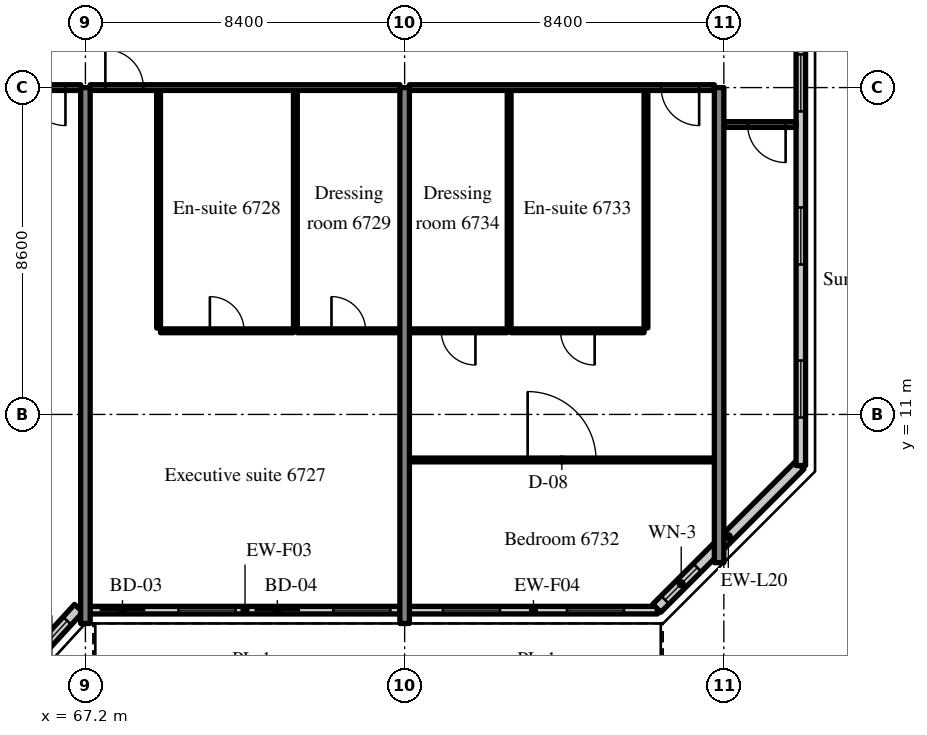
"""IFC4 building model, lengths in metres.
Left out: names, types, materials, properties, quantities, classifications, styles, units other than length and angle.
Written with IfcOpenShell. Run it as: python <this file> out.ifc"""

import sys

from ifc_helpers import new_model, si_unit, direction, frame, frame_2d, origin, place, context, subcontext, project, spatial, rectangle, extrude, source, transform, mapped, element, fill, save


model = new_model("IFC4")
c1 = context("Model", 3, precision=1e-05, world=origin(), true_north=direction((0.0, 1.0)))
c2 = subcontext(c1, "Body", "Model", "MODEL_VIEW")
j1 = project(units=[si_unit("LENGTHUNIT", "METRE"), si_unit("PLANEANGLEUNIT", "RADIAN")], contexts=[c1])
p1 = place(None, origin())
s1 = spatial("IfcSite", under=j1, at=p1, CompositionType="ELEMENT")
p2 = place(p1, origin())
s2 = spatial("IfcBuilding", under=s1, at=p2, CompositionType="ELEMENT")
p3 = place(p2, frame((0.0, 0.0, 281.7)))
s3 = spatial("IfcBuildingStorey", under=s2, at=p3, CompositionType="ELEMENT", Elevation=281.7)
m1 = source(origin(), c2, "Body", "SweptSolid", [
    extrude(rectangle(XDim=14.1, YDim=0.25, at=frame_2d((7.05, 0.0))), origin(), (0.0, 0.0, 1.0), 3.72),
])
for number, where, z_axis, x_axis in (
    (1, (67.2, 5.5, 0.0), (0.0, 0.0, 1.0), (0.0, 1.0, 0.0)),
    (2, (75.6, 5.5, 0.0), (0.0, 0.0, 1.0), (0.0, 1.0, 0.0)),
):
    element("IfcWall", number, at=place(p3, frame(where, z_axis=z_axis, x_axis=x_axis)), inside=s3, PredefinedType="SHEAR", context=c2, shape_type="MappedRepresentation", body=[
        mapped(m1, transform((0.0, 0.0, 0.0), scale=1.0)),
    ])
m2 = source(origin(), c2, "Body", "SweptSolid", [
    extrude(rectangle(XDim=12.5, YDim=0.25, at=frame_2d((6.25, 0.0))), origin(), (0.0, 0.0, 1.0), 3.72),
])
p4 = place(p3, frame((83.875, 7.1, 0.0), z_axis=(0.0, 0.0, 1.0), x_axis=(0.0, 1.0, 0.0)))
e3 = element("IfcWall", 3, at=p4, inside=s3, PredefinedType="SHEAR", context=c2, shape_type="MappedRepresentation", body=[
    mapped(m2, transform((0.0, 0.0, 0.0), scale=1.0)),
])
m3 = source(origin(), c2, "Body", "SweptSolid", [
    extrude(rectangle(XDim=2.398, YDim=0.3, at=frame_2d((1.199, 0.0))), origin(), (0.0, 0.0, 1.0), 3.72),
])
p5 = place(p3, frame((65.404, 4.131, 0.0), z_axis=(0.0, 0.0, 1.0), x_axis=(0.675374189419, 0.737475222815, 0.0)))
e4 = element("IfcWall", 4, at=p5, inside=s3, PredefinedType="SOLIDWALL", context=c2, shape_type="MappedRepresentation", body=[
    mapped(m3, transform((0.0, 0.0, 0.0), scale=1.0)),
])
m4 = source(origin(), c2, "Body", "SweptSolid", [
    extrude(rectangle(XDim=1.5, YDim=2.0, at=frame_2d((0.75, 1.0))), frame((0.0, 0.16, 0.0), z_axis=(0.0, -1.0, 0.0), x_axis=(1.0, 0.0, 0.0)), (0.0, 0.0, 1.0), 0.32),
])
p6 = place(p5, frame((0.449, 0.0, 0.9)))
e5 = element("IfcOpeningElement", 5, at=p6, cuts=e4, PredefinedType="OPENING", context=c2, shape_type="MappedRepresentation", body=[
    mapped(m4, transform((0.0, 0.0, 0.0), scale=1.0)),
])
m5 = source(origin(), c2, "Body", "SweptSolid", [
    extrude(rectangle(XDim=8.15, YDim=0.2, at=frame_2d((4.075, 0.0))), origin(), (0.0, 0.0, 1.0), 3.17),
])
p7 = place(p3, frame((67.325, 5.85, 0.0), z_axis=(0.0, 0.0, 1.0), x_axis=(1.0, 0.0, 0.0)))
e6 = element("IfcWall", 6, at=p7, inside=s3, PredefinedType="SOLIDWALL", context=c2, shape_type="MappedRepresentation", body=[
    mapped(m5, transform((0.0, 0.0, 0.0), scale=1.0)),
])
m6 = source(origin(), c2, "Body", "SweptSolid", [
    extrude(rectangle(XDim=1.2, YDim=2.4, at=frame_2d((0.6, 1.2))), frame((0.0, 0.11, 0.0), z_axis=(0.0, -1.0, 0.0), x_axis=(1.0, 0.0, 0.0)), (0.0, 0.0, 1.0), 0.22),
])
p8 = place(p7, frame((0.25, 0.0, 0.0)))
e7 = element("IfcOpeningElement", 7, at=p8, cuts=e6, PredefinedType="OPENING", context=c2, shape_type="MappedRepresentation", body=[
    mapped(m6, transform((0.0, 0.0, 0.0), scale=1.0)),
])
m7 = source(origin(), c2, "Body", "SweptSolid", [
    extrude(rectangle(XDim=1.5, YDim=1.5, at=frame_2d((0.75, 0.75))), frame((0.0, 0.11, 0.0), z_axis=(0.0, -1.0, 0.0), x_axis=(1.0, 0.0, 0.0)), (0.0, 0.0, 1.0), 0.22),
])
p9 = place(p7, frame((2.325, 0.0, 0.9)))
e8 = element("IfcOpeningElement", 8, at=p9, cuts=e6, PredefinedType="OPENING", context=c2, shape_type="MappedRepresentation", body=[
    mapped(m7, transform((0.0, 0.0, 0.0), scale=1.0)),
])
p10 = place(p7, frame((4.325, 0.0, 0.0)))
e9 = element("IfcOpeningElement", 9, at=p10, cuts=e6, PredefinedType="OPENING", context=c2, shape_type="MappedRepresentation", body=[
    mapped(m6, transform((0.0, 0.0, 0.0), scale=1.0)),
])
p11 = place(p7, frame((6.4, 0.0, 0.9)))
e10 = element("IfcOpeningElement", 10, at=p11, cuts=e6, PredefinedType="OPENING", context=c2, shape_type="MappedRepresentation", body=[
    mapped(m7, transform((0.0, 0.0, 0.0), scale=1.0)),
])
m8 = source(origin(), c2, "Body", "SweptSolid", [
    extrude(rectangle(XDim=6.53, YDim=0.2, at=frame_2d((3.265, 0.0))), origin(), (0.0, 0.0, 1.0), 3.17),
])
p12 = place(p3, frame((75.725, 5.85, 0.0), z_axis=(0.0, 0.0, 1.0), x_axis=(1.0, 0.0, 0.0)))
e11 = element("IfcWall", 11, at=p12, inside=s3, PredefinedType="SOLIDWALL", context=c2, shape_type="MappedRepresentation", body=[
    mapped(m8, transform((0.0, 0.0, 0.0), scale=1.0)),
])
p13 = place(p12, frame((0.883, 0.0, 0.9)))
e12 = element("IfcOpeningElement", 12, at=p13, cuts=e11, PredefinedType="OPENING", context=c2, shape_type="MappedRepresentation", body=[
    mapped(m7, transform((0.0, 0.0, 0.0), scale=1.0)),
])
p14 = place(p12, frame((4.147, 0.0, 0.9)))
e13 = element("IfcOpeningElement", 13, at=p14, cuts=e11, PredefinedType="OPENING", context=c2, shape_type="MappedRepresentation", body=[
    mapped(m7, transform((0.0, 0.0, 0.0), scale=1.0)),
])
m9 = source(origin(), c2, "Body", "SweptSolid", [
    extrude(rectangle(XDim=5.326, YDim=0.3, at=frame_2d((2.663, 0.0))), origin(), (0.0, 0.0, 1.0), 3.72),
])
p15 = place(p3, frame((82.234, 5.9, 0.0), z_axis=(0.0, 0.0, 1.0), x_axis=(0.707083859269, 0.707129702361, 0.0)))
e14 = element("IfcWall", 14, at=p15, inside=s3, PredefinedType="SOLIDWALL", context=c2, shape_type="MappedRepresentation", body=[
    mapped(m9, transform((0.0, 0.0, 0.0), scale=1.0)),
])
m10 = source(origin(), c2, "Body", "SweptSolid", [
    extrude(rectangle(XDim=1.2, YDim=1.5, at=frame_2d((0.6, 0.75))), frame((0.0, 0.16, 0.0), z_axis=(0.0, -1.0, 0.0), x_axis=(1.0, 0.0, 0.0)), (0.0, 0.0, 1.0), 0.32),
])
p16 = place(p15, frame((0.31, 0.0, 0.9)))
e15 = element("IfcOpeningElement", 15, at=p16, cuts=e14, PredefinedType="OPENING", context=c2, shape_type="MappedRepresentation", body=[
    mapped(m10, transform((0.0, 0.0, 0.0), scale=1.0)),
])
m11 = source(origin(), c2, "Body", "SweptSolid", [
    extrude(rectangle(XDim=28.189, YDim=0.25, at=frame_2d((14.095, 0.0))), origin(), (0.0, 0.0, 1.0), 3.72),
])
p17 = place(p3, frame((86.025, 9.655, 0.0), z_axis=(0.0, 0.0, 1.0), x_axis=(0.0, 1.0, 0.0)))
e16 = element("IfcWall", 16, at=p17, inside=s3, PredefinedType="SOLIDWALL", context=c2, shape_type="MappedRepresentation", body=[
    mapped(m11, transform((0.0, 0.0, 0.0), scale=1.0)),
])
m12 = source(origin(), c2, "Body", "SweptSolid", [
    extrude(rectangle(XDim=1.5, YDim=1.5, at=frame_2d((0.75, 0.75))), frame((0.0, 0.135, 0.0), z_axis=(0.0, -1.0, 0.0), x_axis=(1.0, 0.0, 0.0)), (0.0, 0.0, 1.0), 0.27),
])
p18 = place(p17, frame((1.263, 0.0, 0.9)))
e17 = element("IfcOpeningElement", 17, at=p18, cuts=e16, PredefinedType="OPENING", context=c2, shape_type="MappedRepresentation", body=[
    mapped(m12, transform((0.0, 0.0, 0.0), scale=1.0)),
])
p19 = place(p17, frame((5.291, 0.0, 0.9)))
e18 = element("IfcOpeningElement", 18, at=p19, cuts=e16, PredefinedType="OPENING", context=c2, shape_type="MappedRepresentation", body=[
    mapped(m12, transform((0.0, 0.0, 0.0), scale=1.0)),
])
p20 = place(p17, frame((9.318, 0.0, 0.9)))
e19 = element("IfcOpeningElement", 19, at=p20, cuts=e16, PredefinedType="OPENING", context=c2, shape_type="MappedRepresentation", body=[
    mapped(m12, transform((0.0, 0.0, 0.0), scale=1.0)),
])
p21 = place(p17, frame((13.345, 0.0, 0.9)))
e20 = element("IfcOpeningElement", 20, at=p21, cuts=e16, PredefinedType="OPENING", context=c2, shape_type="MappedRepresentation", body=[
    mapped(m12, transform((0.0, 0.0, 0.0), scale=1.0)),
])
p22 = place(p17, frame((17.372, 0.0, 0.9)))
e21 = element("IfcOpeningElement", 21, at=p22, cuts=e16, PredefinedType="OPENING", context=c2, shape_type="MappedRepresentation", body=[
    mapped(m12, transform((0.0, 0.0, 0.0), scale=1.0)),
])
p23 = place(p17, frame((21.399, 0.0, 0.9)))
e22 = element("IfcOpeningElement", 22, at=p23, cuts=e16, PredefinedType="OPENING", context=c2, shape_type="MappedRepresentation", body=[
    mapped(m12, transform((0.0, 0.0, 0.0), scale=1.0)),
])
p24 = place(p17, frame((25.426, 0.0, 0.9)))
e23 = element("IfcOpeningElement", 23, at=p24, cuts=e16, PredefinedType="OPENING", context=c2, shape_type="MappedRepresentation", body=[
    mapped(m12, transform((0.0, 0.0, 0.0), scale=1.0)),
])
m13 = source(origin(), c2, "Body", "SweptSolid", [
    extrude(rectangle(XDim=8.15, YDim=0.15, at=frame_2d((4.075, 0.0))), origin(), (0.0, 0.0, 1.0), 3.02),
])
p25 = place(p3, frame((58.925, 19.6, 0.0), z_axis=(0.0, 0.0, 1.0), x_axis=(1.0, 0.0, 0.0)))
e24 = element("IfcWall", 24, at=p25, inside=s3, PredefinedType="PARTITIONING", context=c2, shape_type="MappedRepresentation", body=[
    mapped(m13, transform((0.0, 0.0, 0.0), scale=1.0)),
])
m14 = source(origin(), c2, "Body", "SweptSolid", [
    extrude(rectangle(XDim=1.0, YDim=2.1, at=frame_2d((0.5, 1.05))), frame((0.0, 0.085, 0.0), z_axis=(0.0, -1.0, 0.0), x_axis=(1.0, 0.0, 0.0)), (0.0, 0.0, 1.0), 0.17),
])
p26 = place(p25, frame((6.75, 0.0, 0.0)))
e25 = element("IfcOpeningElement", 25, at=p26, cuts=e24, PredefinedType="OPENING", context=c2, shape_type="MappedRepresentation", body=[
    mapped(m14, transform((0.0, 0.0, 0.0), scale=1.0)),
])
m15 = source(origin(), c2, "Body", "SweptSolid", [
    extrude(rectangle(XDim=6.25, YDim=0.1, at=frame_2d((3.125, 0.0))), origin(), (0.0, 0.0, 1.0), 3.72),
])
for number, where, z_axis, x_axis in (
    (26, (69.125, 13.275, 0.0), (0.0, 0.0, 1.0), (0.0, 1.0, 0.0)),
    (27, (72.725, 13.275, 0.0), (0.0, 0.0, 1.0), (0.0, 1.0, 0.0)),
):
    element("IfcWall", number, at=place(p3, frame(where, z_axis=z_axis, x_axis=x_axis)), inside=s3, PredefinedType="PARTITIONING", context=c2, shape_type="MappedRepresentation", body=[
        mapped(m15, transform((0.0, 0.0, 0.0), scale=1.0)),
    ])
m16 = source(origin(), c2, "Body", "SweptSolid", [
    extrude(rectangle(XDim=3.5, YDim=0.1, at=frame_2d((1.75, 0.0))), origin(), (0.0, 0.0, 1.0), 3.72),
])
p27 = place(p3, frame((69.175, 13.2, 0.0), z_axis=(0.0, 0.0, 1.0), x_axis=(1.0, 0.0, 0.0)))
e28 = element("IfcWall", 28, at=p27, inside=s3, PredefinedType="PARTITIONING", context=c2, shape_type="MappedRepresentation", body=[
    mapped(m16, transform((0.0, 0.0, 0.0), scale=1.0)),
])
m17 = source(origin(), c2, "Body", "SweptSolid", [
    extrude(rectangle(XDim=0.9, YDim=2.1, at=frame_2d((0.45, 1.05))), frame((0.0, 0.06, 0.0), z_axis=(0.0, -1.0, 0.0), x_axis=(1.0, 0.0, 0.0)), (0.0, 0.0, 1.0), 0.12),
])
p28 = place(p27, frame((1.3, 0.0, 0.0)))
e29 = element("IfcOpeningElement", 29, at=p28, cuts=e28, PredefinedType="OPENING", context=c2, shape_type="MappedRepresentation", body=[
    mapped(m17, transform((0.0, 0.0, 0.0), scale=1.0)),
])
m18 = source(origin(), c2, "Body", "SweptSolid", [
    extrude(rectangle(XDim=2.7, YDim=0.1, at=frame_2d((1.35, 0.0))), origin(), (0.0, 0.0, 1.0), 3.72),
])
p29 = place(p3, frame((72.775, 13.2, 0.0), z_axis=(0.0, 0.0, 1.0), x_axis=(1.0, 0.0, 0.0)))
e30 = element("IfcWall", 30, at=p29, inside=s3, PredefinedType="PARTITIONING", context=c2, shape_type="MappedRepresentation", body=[
    mapped(m18, transform((0.0, 0.0, 0.0), scale=1.0)),
])
p30 = place(p29, frame((0.9, 0.0, 0.0)))
e31 = element("IfcOpeningElement", 31, at=p30, cuts=e30, PredefinedType="OPENING", context=c2, shape_type="MappedRepresentation", body=[
    mapped(m17, transform((0.0, 0.0, 0.0), scale=1.0)),
])
m19 = source(origin(), c2, "Body", "SweptSolid", [
    extrude(rectangle(XDim=8.15, YDim=0.15, at=frame_2d((4.075, 0.0))), origin(), (0.0, 0.0, 1.0), 3.02),
])
p31 = place(p3, frame((67.325, 19.6, 0.0), z_axis=(0.0, 0.0, 1.0), x_axis=(1.0, 0.0, 0.0)))
e32 = element("IfcWall", 32, at=p31, inside=s3, PredefinedType="PARTITIONING", context=c2, shape_type="MappedRepresentation", body=[
    mapped(m19, transform((0.0, 0.0, 0.0), scale=1.0)),
])
p32 = place(p31, frame((0.4, 0.0, 0.0)))
e33 = element("IfcOpeningElement", 33, at=p32, cuts=e32, PredefinedType="OPENING", context=c2, shape_type="MappedRepresentation", body=[
    mapped(m14, transform((0.0, 0.0, 0.0), scale=1.0)),
])
for number, where, z_axis, x_axis in (
    (34, (81.95, 13.275, 0.0), (0.0, 0.0, 1.0), (0.0, 1.0, 0.0)),
    (35, (78.35, 13.275, 0.0), (0.0, 0.0, 1.0), (0.0, 1.0, 0.0)),
):
    element("IfcWall", number, at=place(p3, frame(where, z_axis=z_axis, x_axis=x_axis)), inside=s3, PredefinedType="PARTITIONING", context=c2, shape_type="MappedRepresentation", body=[
        mapped(m15, transform((0.0, 0.0, 0.0), scale=1.0)),
    ])
p33 = place(p3, frame((78.4, 13.2, 0.0), z_axis=(0.0, 0.0, 1.0), x_axis=(1.0, 0.0, 0.0)))
e36 = element("IfcWall", 36, at=p33, inside=s3, PredefinedType="PARTITIONING", context=c2, shape_type="MappedRepresentation", body=[
    mapped(m16, transform((0.0, 0.0, 0.0), scale=1.0)),
])
p34 = place(p33, frame((1.3, 0.0, 0.0)))
e37 = element("IfcOpeningElement", 37, at=p34, cuts=e36, PredefinedType="OPENING", context=c2, shape_type="MappedRepresentation", body=[
    mapped(m17, transform((0.0, 0.0, 0.0), scale=1.0)),
])
m20 = source(origin(), c2, "Body", "SweptSolid", [
    extrude(rectangle(XDim=2.575, YDim=0.1, at=frame_2d((1.288, 0.0))), origin(), (0.0, 0.0, 1.0), 3.72),
])
p35 = place(p3, frame((75.725, 13.2, 0.0), z_axis=(0.0, 0.0, 1.0), x_axis=(1.0, 0.0, 0.0)))
e38 = element("IfcWall", 38, at=p35, inside=s3, PredefinedType="PARTITIONING", context=c2, shape_type="MappedRepresentation", body=[
    mapped(m20, transform((0.0, 0.0, 0.0), scale=1.0)),
])
p36 = place(p35, frame((0.838, 0.0, 0.0)))
e39 = element("IfcOpeningElement", 39, at=p36, cuts=e38, PredefinedType="OPENING", context=c2, shape_type="MappedRepresentation", body=[
    mapped(m17, transform((0.0, 0.0, 0.0), scale=1.0)),
])
m21 = source(origin(), c2, "Body", "SweptSolid", [
    extrude(rectangle(XDim=8.025, YDim=0.1, at=frame_2d((4.012, 0.0))), origin(), (0.0, 0.0, 1.0), 3.72),
])
p37 = place(p3, frame((75.725, 9.802, 0.0), z_axis=(0.0, 0.0, 1.0), x_axis=(1.0, 0.0, 0.0)))
e40 = element("IfcWall", 40, at=p37, inside=s3, PredefinedType="PARTITIONING", context=c2, shape_type="MappedRepresentation", body=[
    mapped(m21, transform((0.0, 0.0, 0.0), scale=1.0)),
])
m22 = source(origin(), c2, "Body", "SweptSolid", [
    extrude(rectangle(XDim=1.8, YDim=2.1, at=frame_2d((0.9, 1.05))), frame((0.0, 0.06, 0.0), z_axis=(0.0, -1.0, 0.0), x_axis=(1.0, 0.0, 0.0)), (0.0, 0.0, 1.0), 0.12),
])
p38 = place(p37, frame((3.112, 0.0, 0.0)))
e41 = element("IfcOpeningElement", 41, at=p38, cuts=e40, PredefinedType="OPENING", context=c2, shape_type="MappedRepresentation", body=[
    mapped(m22, transform((0.0, 0.0, 0.0), scale=1.0)),
])
m23 = source(origin(), c2, "Body", "SweptSolid", [
    extrude(rectangle(XDim=8.025, YDim=0.15, at=frame_2d((4.012, 0.0))), origin(), (0.0, 0.0, 1.0), 3.02),
])
p39 = place(p3, frame((75.725, 19.6, 0.0), z_axis=(0.0, 0.0, 1.0), x_axis=(1.0, 0.0, 0.0)))
e42 = element("IfcWall", 42, at=p39, inside=s3, PredefinedType="PARTITIONING", context=c2, shape_type="MappedRepresentation", body=[
    mapped(m23, transform((0.0, 0.0, 0.0), scale=1.0)),
])
p40 = place(p39, frame((6.625, 0.0, 0.0)))
e43 = element("IfcOpeningElement", 43, at=p40, cuts=e42, PredefinedType="OPENING", context=c2, shape_type="MappedRepresentation", body=[
    mapped(m14, transform((0.0, 0.0, 0.0), scale=1.0)),
])
m24 = source(origin(), c2, "Body", "SweptSolid", [
    extrude(rectangle(XDim=1.9, YDim=0.15, at=frame_2d((0.95, 0.0))), origin(), (0.0, 0.0, 1.0), 3.02),
])
p41 = place(p3, frame((84.0, 18.628, 0.0), z_axis=(0.0, 0.0, 1.0), x_axis=(1.0, 0.0, 0.0)))
e44 = element("IfcWall", 44, at=p41, inside=s3, PredefinedType="PARTITIONING", context=c2, shape_type="MappedRepresentation", body=[
    mapped(m24, transform((0.0, 0.0, 0.0), scale=1.0)),
])
p42 = place(p41, frame((0.625, 0.0, 0.0)))
e45 = element("IfcOpeningElement", 45, at=p42, cuts=e44, PredefinedType="OPENING", context=c2, shape_type="MappedRepresentation", body=[
    mapped(m14, transform((0.0, 0.0, 0.0), scale=1.0)),
])
m25 = source(origin(), c2, "Body", "SweptSolid", [
    extrude(rectangle(XDim=1.5, YDim=2.0, at=frame_2d((0.75, 1.0))), frame((0.0, 0.03, 0.0), z_axis=(0.0, -1.0, 0.0), x_axis=(1.0, 0.0, 0.0)), (0.0, 0.0, 1.0), 0.06),
])
p43 = place(p6, origin())
e46 = element("IfcWindow", 46, at=p43, inside=s3, PartitioningType="SINGLE_PANEL", PredefinedType="WINDOW", context=c2, shape_type="MappedRepresentation", body=[
    mapped(m25, transform((0.0, 0.0, 0.0), scale=1.0)),
])
fill(e5, e46)
m26 = source(origin(), c2, "Body", "SweptSolid", [
    extrude(rectangle(XDim=1.2, YDim=2.4, at=frame_2d((0.6, 1.2))), frame((0.0, 0.025, 0.0), z_axis=(0.0, -1.0, 0.0), x_axis=(1.0, 0.0, 0.0)), (0.0, 0.0, 1.0), 0.05),
])
p44 = place(p8, origin())
e47 = element("IfcDoor", 47, at=p44, inside=s3, OperationType="SLIDING_TO_LEFT", PredefinedType="DOOR", context=c2, shape_type="MappedRepresentation", body=[
    mapped(m26, transform((0.0, 0.0, 0.0), scale=1.0)),
])
fill(e7, e47)
m27 = source(origin(), c2, "Body", "SweptSolid", [
    extrude(rectangle(XDim=1.5, YDim=1.5, at=frame_2d((0.75, 0.75))), frame((0.0, 0.03, 0.0), z_axis=(0.0, -1.0, 0.0), x_axis=(1.0, 0.0, 0.0)), (0.0, 0.0, 1.0), 0.06),
])
p45 = place(p9, origin())
e48 = element("IfcWindow", 48, at=p45, inside=s3, PartitioningType="SINGLE_PANEL", PredefinedType="WINDOW", context=c2, shape_type="MappedRepresentation", body=[
    mapped(m27, transform((0.0, 0.0, 0.0), scale=1.0)),
])
fill(e8, e48)
p46 = place(p10, origin())
e49 = element("IfcDoor", 49, at=p46, inside=s3, OperationType="SLIDING_TO_RIGHT", PredefinedType="DOOR", context=c2, shape_type="MappedRepresentation", body=[
    mapped(m26, transform((0.0, 0.0, 0.0), scale=1.0)),
])
fill(e9, e49)
p47 = place(p11, origin())
e50 = element("IfcWindow", 50, at=p47, inside=s3, PartitioningType="SINGLE_PANEL", PredefinedType="WINDOW", context=c2, shape_type="MappedRepresentation", body=[
    mapped(m27, transform((0.0, 0.0, 0.0), scale=1.0)),
])
fill(e10, e50)
p48 = place(p13, origin())
e51 = element("IfcWindow", 51, at=p48, inside=s3, PartitioningType="SINGLE_PANEL", PredefinedType="WINDOW", context=c2, shape_type="MappedRepresentation", body=[
    mapped(m27, transform((0.0, 0.0, 0.0), scale=1.0)),
])
fill(e12, e51)
p49 = place(p14, origin())
e52 = element("IfcWindow", 52, at=p49, inside=s3, PartitioningType="SINGLE_PANEL", PredefinedType="WINDOW", context=c2, shape_type="MappedRepresentation", body=[
    mapped(m27, transform((0.0, 0.0, 0.0), scale=1.0)),
])
fill(e13, e52)
m28 = source(origin(), c2, "Body", "SweptSolid", [
    extrude(rectangle(XDim=1.2, YDim=1.5, at=frame_2d((0.6, 0.75))), frame((0.0, 0.03, 0.0), z_axis=(0.0, -1.0, 0.0), x_axis=(1.0, 0.0, 0.0)), (0.0, 0.0, 1.0), 0.06),
])
p50 = place(p16, origin())
e53 = element("IfcWindow", 53, at=p50, inside=s3, PartitioningType="SINGLE_PANEL", PredefinedType="WINDOW", context=c2, shape_type="MappedRepresentation", body=[
    mapped(m28, transform((0.0, 0.0, 0.0), scale=1.0)),
])
fill(e15, e53)
p51 = place(p18, origin())
e54 = element("IfcWindow", 54, at=p51, inside=s3, PartitioningType="SINGLE_PANEL", PredefinedType="WINDOW", context=c2, shape_type="MappedRepresentation", body=[
    mapped(m27, transform((0.0, 0.0, 0.0), scale=1.0)),
])
fill(e17, e54)
p52 = place(p19, origin())
e55 = element("IfcWindow", 55, at=p52, inside=s3, PartitioningType="SINGLE_PANEL", PredefinedType="WINDOW", context=c2, shape_type="MappedRepresentation", body=[
    mapped(m27, transform((0.0, 0.0, 0.0), scale=1.0)),
])
fill(e18, e55)
p53 = place(p20, origin())
e56 = element("IfcWindow", 56, at=p53, inside=s3, PartitioningType="SINGLE_PANEL", PredefinedType="WINDOW", context=c2, shape_type="MappedRepresentation", body=[
    mapped(m27, transform((0.0, 0.0, 0.0), scale=1.0)),
])
fill(e19, e56)
m29 = source(origin(), c2, "Body", "SweptSolid", [
    extrude(rectangle(XDim=1.0, YDim=2.1, at=frame_2d((0.5, 1.05))), frame((0.0, 0.025, 0.0), z_axis=(0.0, -1.0, 0.0), x_axis=(1.0, 0.0, 0.0)), (0.0, 0.0, 1.0), 0.05),
])
p54 = place(p26, origin())
e57 = element("IfcDoor", 57, at=p54, inside=s3, OperationType="SINGLE_SWING_RIGHT", PredefinedType="DOOR", context=c2, shape_type="MappedRepresentation", body=[
    mapped(m29, transform((0.0, 0.0, 0.0), scale=1.0)),
])
fill(e25, e57)
m30 = source(origin(), c2, "Body", "SweptSolid", [
    extrude(rectangle(XDim=0.9, YDim=2.1, at=frame_2d((0.45, 1.05))), frame((0.0, 0.025, 0.0), z_axis=(0.0, -1.0, 0.0), x_axis=(1.0, 0.0, 0.0)), (0.0, 0.0, 1.0), 0.05),
])
p55 = place(p28, origin())
e58 = element("IfcDoor", 58, at=p55, inside=s3, OperationType="SINGLE_SWING_LEFT", PredefinedType="DOOR", context=c2, shape_type="MappedRepresentation", body=[
    mapped(m30, transform((0.0, 0.0, 0.0), scale=1.0)),
])
fill(e29, e58)
p56 = place(p30, origin())
e59 = element("IfcDoor", 59, at=p56, inside=s3, OperationType="SINGLE_SWING_LEFT", PredefinedType="DOOR", context=c2, shape_type="MappedRepresentation", body=[
    mapped(m30, transform((0.0, 0.0, 0.0), scale=1.0)),
])
fill(e31, e59)
p57 = place(p32, origin())
e60 = element("IfcDoor", 60, at=p57, inside=s3, OperationType="SINGLE_SWING_LEFT", PredefinedType="DOOR", context=c2, shape_type="MappedRepresentation", body=[
    mapped(m29, transform((0.0, 0.0, 0.0), scale=1.0)),
])
fill(e33, e60)
p58 = place(p34, origin())
e61 = element("IfcDoor", 61, at=p58, inside=s3, OperationType="SINGLE_SWING_RIGHT", PredefinedType="DOOR", context=c2, shape_type="MappedRepresentation", body=[
    mapped(m30, transform((0.0, 0.0, 0.0), scale=1.0)),
])
fill(e37, e61)
p59 = place(p36, origin())
e62 = element("IfcDoor", 62, at=p59, inside=s3, OperationType="SINGLE_SWING_RIGHT", PredefinedType="DOOR", context=c2, shape_type="MappedRepresentation", body=[
    mapped(m30, transform((0.0, 0.0, 0.0), scale=1.0)),
])
fill(e39, e62)
m31 = source(origin(), c2, "Body", "SweptSolid", [
    extrude(rectangle(XDim=1.8, YDim=2.1, at=frame_2d((0.9, 1.05))), frame((0.0, 0.025, 0.0), z_axis=(0.0, -1.0, 0.0), x_axis=(1.0, 0.0, 0.0)), (0.0, 0.0, 1.0), 0.05),
])
p60 = place(p38, origin())
e63 = element("IfcDoor", 63, at=p60, inside=s3, OperationType="DOUBLE_DOOR_SINGLE_SWING", PredefinedType="DOOR", context=c2, shape_type="MappedRepresentation", body=[
    mapped(m31, transform((0.0, 0.0, 0.0), scale=1.0)),
])
fill(e41, e63)
p61 = place(p40, origin())
e64 = element("IfcDoor", 64, at=p61, inside=s3, OperationType="SINGLE_SWING_RIGHT", PredefinedType="DOOR", context=c2, shape_type="MappedRepresentation", body=[
    mapped(m29, transform((0.0, 0.0, 0.0), scale=1.0)),
])
fill(e43, e64)
p62 = place(p42, origin())
e65 = element("IfcDoor", 65, at=p62, inside=s3, OperationType="SINGLE_SWING_RIGHT", PredefinedType="DOOR", context=c2, shape_type="MappedRepresentation", body=[
    mapped(m29, transform((0.0, 0.0, 0.0), scale=1.0)),
])
fill(e45, e65)
save(model, sys.argv[1])
